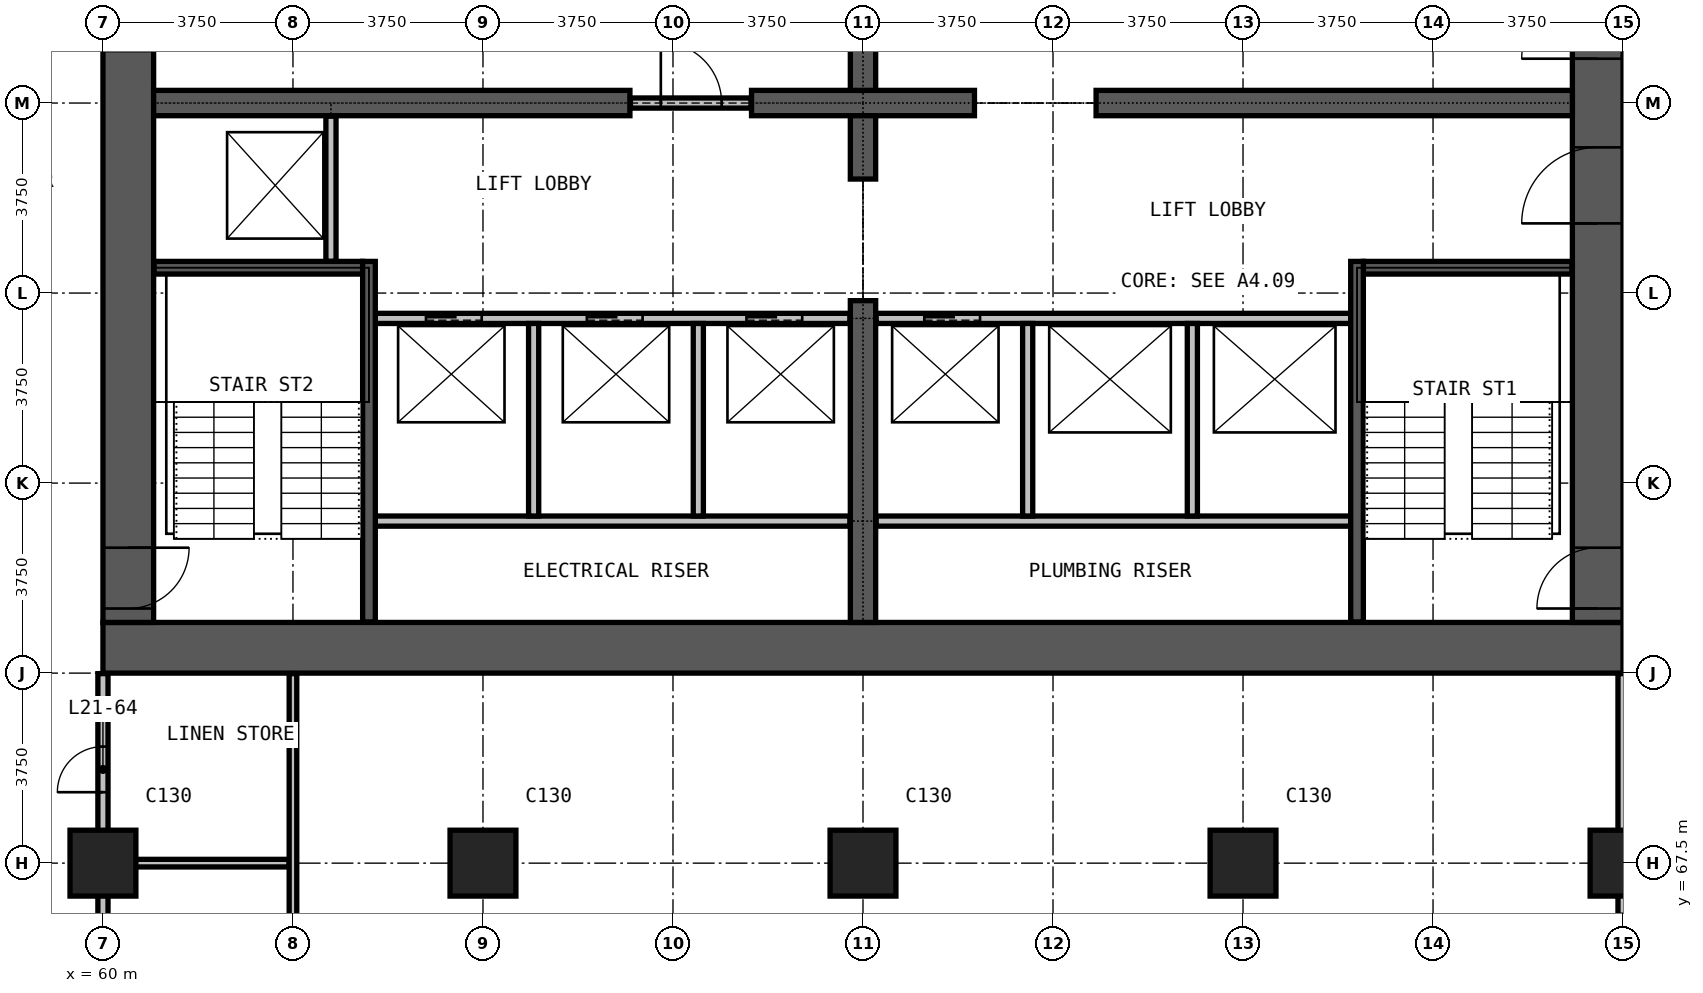
"""IFC4 building model, lengths in metres.
Left out: names, types, materials, properties, quantities, classifications, styles, units other than length and angle.
Written with IfcOpenShell. Run it as: python <this file> out.ifc"""

import sys

from ifc_helpers import new_model, si_unit, direction, frame, frame_2d, origin, origin_2d, place, context, subcontext, project, spatial, rectangle, extrude, element, fill, save


model = new_model("IFC4")
c1 = context("Model", 3, precision=1e-05, world=origin(), true_north=direction((0.0, 1.0)))
c2 = subcontext(c1, "Body", "Model", "MODEL_VIEW")
j1 = project(units=[si_unit("LENGTHUNIT", "METRE"), si_unit("PLANEANGLEUNIT", "RADIAN")], contexts=[c1])
p1 = place(None, origin())
s1 = spatial("IfcSite", under=j1, at=p1, CompositionType="ELEMENT")
p2 = place(p1, origin())
s2 = spatial("IfcBuilding", under=s1, at=p2, CompositionType="ELEMENT")
p3 = place(p2, frame((0.0, 0.0, 89.0)))
s3 = spatial("IfcBuildingStorey", under=s2, at=p3, CompositionType="ELEMENT", Elevation=89.0)
for number, where, z_axis, x_axis in (
    (1, (60.0, 67.5, 0.0), (0.0, 0.0, 1.0), (1.0, 0.0, 0.0)),
    (2, (67.5, 67.5, 0.0), (0.0, 0.0, 1.0), (1.0, 0.0, 0.0)),
    (3, (75.0, 67.5, 0.0), (0.0, 0.0, 1.0), (1.0, 0.0, 0.0)),
    (4, (82.5, 67.5, 0.0), (0.0, 0.0, 1.0), (1.0, 0.0, 0.0)),
    (5, (90.0, 67.5, 0.0), (0.0, 0.0, 1.0), (1.0, 0.0, 0.0)),
):
    element("IfcColumn", number, at=place(p3, frame(where, z_axis=z_axis, x_axis=x_axis)), inside=s3, PredefinedType="COLUMN", context=c2, shape_type="SweptSolid", body=[
        extrude(rectangle(XDim=1.3, YDim=1.3, at=origin_2d()), origin(), (0.0, 0.0, 1.0), 3.3),
    ])
p4 = place(p3, frame((60.0, 71.75, 0.0), z_axis=(0.0, 0.0, 1.0), x_axis=(1.0, 0.0, 0.0)))
e6 = element("IfcWall", 6, at=p4, inside=s3, PredefinedType="SHEAR", context=c2, shape_type="SweptSolid", body=[
    extrude(rectangle(XDim=30.0, YDim=1.0, at=frame_2d((15.0, 0.0))), origin(), (0.0, 0.0, 1.0), 3.3),
])
p5 = place(p3, frame((89.5, 72.25, 0.0), z_axis=(0.0, 0.0, 1.0), x_axis=(0.0, 1.0, 0.0)))
e7 = element("IfcWall", 7, at=p5, inside=s3, PredefinedType="SHEAR", context=c2, shape_type="SweptSolid", body=[
    extrude(rectangle(XDim=20.5, YDim=1.0, at=frame_2d((10.25, 0.0))), origin(), (0.0, 0.0, 1.0), 3.3),
])
p6 = place(p5, frame((0.275, 0.0, 0.0)))
e8 = element("IfcOpeningElement", 8, at=p6, cuts=e7, PredefinedType="OPENING", context=c2, shape_type="SweptSolid", body=[
    extrude(rectangle(XDim=1.2, YDim=2.2, at=frame_2d((0.6, 1.1))), frame((0.0, 0.51, 0.0), z_axis=(0.0, -1.0, 0.0), x_axis=(1.0, 0.0, 0.0)), (0.0, 0.0, 1.0), 1.02),
])
p7 = place(p5, frame((13.775, 0.0, 0.0)))
e9 = element("IfcOpeningElement", 9, at=p7, cuts=e7, PredefinedType="OPENING", context=c2, shape_type="SweptSolid", body=[
    extrude(rectangle(XDim=1.2, YDim=2.2, at=frame_2d((0.6, 1.1))), frame((0.0, 0.51, 0.0), z_axis=(0.0, -1.0, 0.0), x_axis=(1.0, 0.0, 0.0)), (0.0, 0.0, 1.0), 1.02),
])
p8 = place(p5, frame((7.875, 0.0, 0.0)))
e10 = element("IfcOpeningElement", 10, at=p8, cuts=e7, PredefinedType="OPENING", context=c2, shape_type="SweptSolid", body=[
    extrude(rectangle(XDim=1.5, YDim=2.2, at=frame_2d((0.75, 1.1))), frame((0.0, 0.51, 0.0), z_axis=(0.0, -1.0, 0.0), x_axis=(1.0, 0.0, 0.0)), (0.0, 0.0, 1.0), 1.02),
])
p9 = place(p5, frame((11.125, 0.0, 0.0)))
e11 = element("IfcOpeningElement", 11, at=p9, cuts=e7, PredefinedType="OPENING", context=c2, shape_type="SweptSolid", body=[
    extrude(rectangle(XDim=1.5, YDim=2.2, at=frame_2d((0.75, 1.1))), frame((0.0, 0.51, 0.0), z_axis=(0.0, -1.0, 0.0), x_axis=(1.0, 0.0, 0.0)), (0.0, 0.0, 1.0), 1.02),
])
p10 = place(p3, frame((60.5, 92.75, 0.0), z_axis=(0.0, 0.0, 1.0), x_axis=(0.0, -1.0, 0.0)))
e12 = element("IfcWall", 12, at=p10, inside=s3, PredefinedType="SHEAR", context=c2, shape_type="SweptSolid", body=[
    extrude(rectangle(XDim=20.5, YDim=1.0, at=frame_2d((10.25, 0.0))), origin(), (0.0, 0.0, 1.0), 3.3),
])
p11 = place(p10, frame((19.025, 0.0, 0.0)))
e13 = element("IfcOpeningElement", 13, at=p11, cuts=e12, PredefinedType="OPENING", context=c2, shape_type="SweptSolid", body=[
    extrude(rectangle(XDim=1.2, YDim=2.2, at=frame_2d((0.6, 1.1))), frame((0.0, 0.51, 0.0), z_axis=(0.0, -1.0, 0.0), x_axis=(1.0, 0.0, 0.0)), (0.0, 0.0, 1.0), 1.02),
])
p12 = place(p10, frame((8.025, 0.0, 0.0)))
e14 = element("IfcOpeningElement", 14, at=p12, cuts=e12, PredefinedType="OPENING", context=c2, shape_type="SweptSolid", body=[
    extrude(rectangle(XDim=1.2, YDim=2.2, at=frame_2d((0.6, 1.1))), frame((0.0, 0.51, 0.0), z_axis=(0.0, -1.0, 0.0), x_axis=(1.0, 0.0, 0.0)), (0.0, 0.0, 1.0), 1.02),
])
p13 = place(p3, frame((61.0, 82.5, 0.0), z_axis=(0.0, 0.0, 1.0), x_axis=(1.0, 0.0, 0.0)))
e15 = element("IfcWall", 15, at=p13, inside=s3, PredefinedType="SHEAR", context=c2, shape_type="SweptSolid", body=[
    extrude(rectangle(XDim=9.4, YDim=0.5, at=frame_2d((4.7, 0.0))), origin(), (0.0, 0.0, 1.0), 3.3),
])
p14 = place(p3, frame((72.8, 82.5, 0.0), z_axis=(0.0, 0.0, 1.0), x_axis=(1.0, 0.0, 0.0)))
e16 = element("IfcWall", 16, at=p14, inside=s3, PredefinedType="SHEAR", context=c2, shape_type="SweptSolid", body=[
    extrude(rectangle(XDim=4.4, YDim=0.5, at=frame_2d((2.2, 0.0))), origin(), (0.0, 0.0, 1.0), 3.3),
])
p15 = place(p3, frame((79.6, 82.5, 0.0), z_axis=(0.0, 0.0, 1.0), x_axis=(1.0, 0.0, 0.0)))
e17 = element("IfcWall", 17, at=p15, inside=s3, PredefinedType="SHEAR", context=c2, shape_type="SweptSolid", body=[
    extrude(rectangle(XDim=9.4, YDim=0.5, at=frame_2d((4.7, 0.0))), origin(), (0.0, 0.0, 1.0), 3.3),
])
p16 = place(p3, frame((75.0, 72.25, 0.0), z_axis=(0.0, 0.0, 1.0), x_axis=(0.0, 1.0, 0.0)))
e18 = element("IfcWall", 18, at=p16, inside=s3, PredefinedType="SHEAR", context=c2, shape_type="SweptSolid", body=[
    extrude(rectangle(XDim=6.35, YDim=0.5, at=frame_2d((3.175, 0.0))), origin(), (0.0, 0.0, 1.0), 3.3),
])
for number, where, z_axis, x_axis in (
    (19, (75.0, 81.0, 0.0), (0.0, 0.0, 1.0), (0.0, 1.0, 0.0)),
    (20, (75.0, 82.75, 0.0), (0.0, 0.0, 1.0), (0.0, 1.0, 0.0)),
):
    element("IfcWall", number, at=place(p3, frame(where, z_axis=z_axis, x_axis=x_axis)), inside=s3, PredefinedType="SHEAR", context=c2, shape_type="SweptSolid", body=[
        extrude(rectangle(XDim=1.25, YDim=0.5, at=frame_2d((0.625, 0.0))), origin(), (0.0, 0.0, 1.0), 3.3),
    ])
p17 = place(p3, frame((70.41, 82.5, 0.0), z_axis=(0.0, 0.0, 1.0), x_axis=(1.0, 0.0, 0.0)))
e21 = element("IfcWall", 21, at=p17, inside=s3, PredefinedType="PARTITIONING", context=c2, shape_type="SweptSolid", body=[
    extrude(rectangle(XDim=2.38, YDim=0.2, at=frame_2d((1.19, 0.0))), origin(), (0.0, 0.0, 1.0), 2.4),
])
p18 = place(p17, frame((0.6, 0.0, 0.0)))
e22 = element("IfcOpeningElement", 22, at=p18, cuts=e21, PredefinedType="OPENING", context=c2, shape_type="SweptSolid", body=[
    extrude(rectangle(XDim=1.2, YDim=2.2, at=frame_2d((0.6, 1.1))), frame((0.0, 0.11, 0.0), z_axis=(0.0, -1.0, 0.0), x_axis=(1.0, 0.0, 0.0)), (0.0, 0.0, 1.0), 0.22),
])
p19 = place(p3, frame((60.0, 52.4, 0.0), z_axis=(0.0, 0.0, 1.0), x_axis=(0.0, 1.0, 0.0)))
e23 = element("IfcWall", 23, at=p19, inside=s3, PredefinedType="PARTITIONING", context=c2, shape_type="SweptSolid", body=[
    extrude(rectangle(XDim=18.84, YDim=0.2, at=frame_2d((9.42, 0.0))), origin(), (0.0, 0.0, 1.0), 3.0),
])
p20 = place(p19, frame((3.35, 0.0, 0.0)))
e24 = element("IfcOpeningElement", 24, at=p20, cuts=e23, PredefinedType="OPENING", context=c2, shape_type="SweptSolid", body=[
    extrude(rectangle(XDim=1.0, YDim=2.2, at=frame_2d((0.5, 1.1))), frame((0.0, 0.11, 0.0), z_axis=(0.0, -1.0, 0.0), x_axis=(1.0, 0.0, 0.0)), (0.0, 0.0, 1.0), 0.22),
])
p21 = place(p19, frame((10.9, 0.0, 0.0)))
e25 = element("IfcOpeningElement", 25, at=p21, cuts=e23, PredefinedType="OPENING", context=c2, shape_type="SweptSolid", body=[
    extrude(rectangle(XDim=0.9, YDim=2.2, at=frame_2d((0.45, 1.1))), frame((0.0, 0.11, 0.0), z_axis=(0.0, -1.0, 0.0), x_axis=(1.0, 0.0, 0.0)), (0.0, 0.0, 1.0), 0.22),
])
p22 = place(p19, frame((16.5, 0.0, 0.0)))
e26 = element("IfcOpeningElement", 26, at=p22, cuts=e23, PredefinedType="OPENING", context=c2, shape_type="SweptSolid", body=[
    extrude(rectangle(XDim=0.9, YDim=2.2, at=frame_2d((0.45, 1.1))), frame((0.0, 0.11, 0.0), z_axis=(0.0, -1.0, 0.0), x_axis=(1.0, 0.0, 0.0)), (0.0, 0.0, 1.0), 0.22),
])
p23 = place(p3, frame((90.0, 52.4, 0.0), z_axis=(0.0, 0.0, 1.0), x_axis=(0.0, 1.0, 0.0)))
e27 = element("IfcWall", 27, at=p23, inside=s3, PredefinedType="PARTITIONING", context=c2, shape_type="SweptSolid", body=[
    extrude(rectangle(XDim=18.84, YDim=0.2, at=frame_2d((9.42, 0.0))), origin(), (0.0, 0.0, 1.0), 3.0),
])
p24 = place(p23, frame((3.35, 0.0, 0.0)))
e28 = element("IfcOpeningElement", 28, at=p24, cuts=e27, PredefinedType="OPENING", context=c2, shape_type="SweptSolid", body=[
    extrude(rectangle(XDim=1.0, YDim=2.2, at=frame_2d((0.5, 1.1))), frame((0.0, 0.11, 0.0), z_axis=(0.0, -1.0, 0.0), x_axis=(1.0, 0.0, 0.0)), (0.0, 0.0, 1.0), 0.22),
])
p25 = place(p23, frame((12.3, 0.0, 0.0)))
e29 = element("IfcOpeningElement", 29, at=p25, cuts=e27, PredefinedType="OPENING", context=c2, shape_type="SweptSolid", body=[
    extrude(rectangle(XDim=1.8, YDim=2.2, at=frame_2d((0.9, 1.1))), frame((0.0, 0.11, 0.0), z_axis=(0.0, -1.0, 0.0), x_axis=(1.0, 0.0, 0.0)), (0.0, 0.0, 1.0), 0.22),
])
p26 = place(p3, frame((60.1, 67.5, 0.0), z_axis=(0.0, 0.0, 1.0), x_axis=(1.0, 0.0, 0.0)))
e30 = element("IfcWall", 30, at=p26, inside=s3, PredefinedType="PARTITIONING", context=c2, shape_type="SweptSolid", body=[
    extrude(rectangle(XDim=3.575, YDim=0.15, at=frame_2d((1.788, 0.0))), origin(), (0.0, 0.0, 1.0), 3.0),
])
p27 = place(p3, frame((63.75, 60.075, 0.0), z_axis=(0.0, 0.0, 1.0), x_axis=(0.0, 1.0, 0.0)))
e31 = element("IfcWall", 31, at=p27, inside=s3, PredefinedType="PARTITIONING", context=c2, shape_type="SweptSolid", body=[
    extrude(rectangle(XDim=11.165, YDim=0.15, at=frame_2d((5.583, 0.0))), origin(), (0.0, 0.0, 1.0), 3.0),
])
for number, where, z_axis, x_axis in (
    (32, (65.375, 74.25, 0.0), (0.0, 0.0, 1.0), (1.0, 0.0, 0.0)),
    (33, (75.26, 74.25, 0.0), (0.0, 0.0, 1.0), (1.0, 0.0, 0.0)),
):
    element("IfcWall", number, at=place(p3, frame(where, z_axis=z_axis, x_axis=x_axis)), inside=s3, PredefinedType="PARTITIONING", context=c2, shape_type="SweptSolid", body=[
        extrude(rectangle(XDim=9.365, YDim=0.2, at=frame_2d((4.683, 0.0))), origin(), (0.0, 0.0, 1.0), 3.0),
    ])
p28 = place(p3, frame((65.375, 78.25, 0.0), z_axis=(0.0, 0.0, 1.0), x_axis=(1.0, 0.0, 0.0)))
e34 = element("IfcWall", 34, at=p28, inside=s3, PredefinedType="PARTITIONING", context=c2, shape_type="SweptSolid", body=[
    extrude(rectangle(XDim=9.365, YDim=0.2, at=frame_2d((4.683, 0.0))), origin(), (0.0, 0.0, 1.0), 3.0),
])
p29 = place(p28, frame((1.0, 0.0, 0.0)))
e35 = element("IfcOpeningElement", 35, at=p29, cuts=e34, PredefinedType="OPENING", context=c2, shape_type="SweptSolid", body=[
    extrude(rectangle(XDim=1.1, YDim=2.2, at=frame_2d((0.55, 1.1))), frame((0.0, 0.11, 0.0), z_axis=(0.0, -1.0, 0.0), x_axis=(1.0, 0.0, 0.0)), (0.0, 0.0, 1.0), 0.22),
])
p30 = place(p28, frame((4.175, 0.0, 0.0)))
e36 = element("IfcOpeningElement", 36, at=p30, cuts=e34, PredefinedType="OPENING", context=c2, shape_type="SweptSolid", body=[
    extrude(rectangle(XDim=1.1, YDim=2.2, at=frame_2d((0.55, 1.1))), frame((0.0, 0.11, 0.0), z_axis=(0.0, -1.0, 0.0), x_axis=(1.0, 0.0, 0.0)), (0.0, 0.0, 1.0), 0.22),
])
p31 = place(p28, frame((7.325, 0.0, 0.0)))
e37 = element("IfcOpeningElement", 37, at=p31, cuts=e34, PredefinedType="OPENING", context=c2, shape_type="SweptSolid", body=[
    extrude(rectangle(XDim=1.1, YDim=2.2, at=frame_2d((0.55, 1.1))), frame((0.0, 0.11, 0.0), z_axis=(0.0, -1.0, 0.0), x_axis=(1.0, 0.0, 0.0)), (0.0, 0.0, 1.0), 0.22),
])
p32 = place(p3, frame((75.26, 78.25, 0.0), z_axis=(0.0, 0.0, 1.0), x_axis=(1.0, 0.0, 0.0)))
e38 = element("IfcWall", 38, at=p32, inside=s3, PredefinedType="PARTITIONING", context=c2, shape_type="SweptSolid", body=[
    extrude(rectangle(XDim=9.365, YDim=0.2, at=frame_2d((4.683, 0.0))), origin(), (0.0, 0.0, 1.0), 3.0),
])
p33 = place(p32, frame((0.95, 0.0, 0.0)))
e39 = element("IfcOpeningElement", 39, at=p33, cuts=e38, PredefinedType="OPENING", context=c2, shape_type="SweptSolid", body=[
    extrude(rectangle(XDim=1.1, YDim=2.2, at=frame_2d((0.55, 1.1))), frame((0.0, 0.11, 0.0), z_axis=(0.0, -1.0, 0.0), x_axis=(1.0, 0.0, 0.0)), (0.0, 0.0, 1.0), 0.22),
])
p34 = place(p3, frame((64.5, 79.375, 0.0), z_axis=(0.0, 0.0, 1.0), x_axis=(0.0, 1.0, 0.0)))
e40 = element("IfcWall", 40, at=p34, inside=s3, PredefinedType="PARTITIONING", context=c2, shape_type="SweptSolid", body=[
    extrude(rectangle(XDim=2.865, YDim=0.2, at=frame_2d((1.433, 0.0))), origin(), (0.0, 0.0, 1.0), 3.0),
])
for number, where, z_axis, x_axis in (
    (41, (68.5, 74.35, 0.0), (0.0, 0.0, 1.0), (0.0, 1.0, 0.0)),
    (42, (71.75, 74.35, 0.0), (0.0, 0.0, 1.0), (0.0, 1.0, 0.0)),
    (43, (78.25, 74.35, 0.0), (0.0, 0.0, 1.0), (0.0, 1.0, 0.0)),
    (44, (81.5, 74.35, 0.0), (0.0, 0.0, 1.0), (0.0, 1.0, 0.0)),
):
    element("IfcWall", number, at=place(p3, frame(where, z_axis=z_axis, x_axis=x_axis)), inside=s3, PredefinedType="PARTITIONING", context=c2, shape_type="SweptSolid", body=[
        extrude(rectangle(XDim=3.8, YDim=0.2, at=frame_2d((1.9, 0.0))), origin(), (0.0, 0.0, 1.0), 3.0),
    ])
for number, where, z_axis, x_axis in (
    (45, (61.01, 79.25, 0.0), (0.0, 0.0, 1.0), (1.0, 0.0, 0.0)),
    (46, (84.875, 79.25, 0.0), (0.0, 0.0, 1.0), (1.0, 0.0, 0.0)),
):
    element("IfcWall", number, at=place(p3, frame(where, z_axis=z_axis, x_axis=x_axis)), inside=s3, PredefinedType="PARTITIONING", context=c2, shape_type="SweptSolid", body=[
        extrude(rectangle(XDim=4.115, YDim=0.25, at=frame_2d((2.058, 0.0))), origin(), (0.0, 0.0, 1.0), 3.0),
    ])
for number, where, z_axis, x_axis in (
    (47, (65.25, 72.26, 0.0), (0.0, 0.0, 1.0), (0.0, 1.0, 0.0)),
    (48, (84.75, 72.26, 0.0), (0.0, 0.0, 1.0), (0.0, 1.0, 0.0)),
):
    element("IfcWall", number, at=place(p3, frame(where, z_axis=z_axis, x_axis=x_axis)), inside=s3, PredefinedType="PARTITIONING", context=c2, shape_type="SweptSolid", body=[
        extrude(rectangle(XDim=7.115, YDim=0.25, at=frame_2d((3.558, 0.0))), origin(), (0.0, 0.0, 1.0), 3.0),
    ])
p35 = place(p29, origin())
e49 = element("IfcDoor", 49, at=p35, inside=s3, OperationType="DOUBLE_DOOR_SLIDING", PredefinedType="DOOR", context=c2, shape_type="SweptSolid", body=[
    extrude(rectangle(XDim=1.1, YDim=2.2, at=frame_2d((0.55, 1.1))), frame((0.0, 0.025, 0.0), z_axis=(0.0, -1.0, 0.0), x_axis=(1.0, 0.0, 0.0)), (0.0, 0.0, 1.0), 0.05),
])
fill(e35, e49)
p36 = place(p30, origin())
e50 = element("IfcDoor", 50, at=p36, inside=s3, OperationType="DOUBLE_DOOR_SLIDING", PredefinedType="DOOR", context=c2, shape_type="SweptSolid", body=[
    extrude(rectangle(XDim=1.1, YDim=2.2, at=frame_2d((0.55, 1.1))), frame((0.0, 0.025, 0.0), z_axis=(0.0, -1.0, 0.0), x_axis=(1.0, 0.0, 0.0)), (0.0, 0.0, 1.0), 0.05),
])
fill(e36, e50)
p37 = place(p31, origin())
e51 = element("IfcDoor", 51, at=p37, inside=s3, OperationType="DOUBLE_DOOR_SLIDING", PredefinedType="DOOR", context=c2, shape_type="SweptSolid", body=[
    extrude(rectangle(XDim=1.1, YDim=2.2, at=frame_2d((0.55, 1.1))), frame((0.0, 0.025, 0.0), z_axis=(0.0, -1.0, 0.0), x_axis=(1.0, 0.0, 0.0)), (0.0, 0.0, 1.0), 0.05),
])
fill(e37, e51)
p38 = place(p33, origin())
e52 = element("IfcDoor", 52, at=p38, inside=s3, OperationType="DOUBLE_DOOR_SLIDING", PredefinedType="DOOR", context=c2, shape_type="SweptSolid", body=[
    extrude(rectangle(XDim=1.1, YDim=2.2, at=frame_2d((0.55, 1.1))), frame((0.0, 0.025, 0.0), z_axis=(0.0, -1.0, 0.0), x_axis=(1.0, 0.0, 0.0)), (0.0, 0.0, 1.0), 0.05),
])
fill(e39, e52)
p39 = place(p18, origin())
e53 = element("IfcDoor", 53, at=p39, inside=s3, OperationType="SINGLE_SWING_LEFT", PredefinedType="DOOR", context=c2, shape_type="SweptSolid", body=[
    extrude(rectangle(XDim=1.2, YDim=2.2, at=frame_2d((0.6, 1.1))), frame((0.0, 0.025, 0.0), z_axis=(0.0, -1.0, 0.0), x_axis=(1.0, 0.0, 0.0)), (0.0, 0.0, 1.0), 0.05),
])
fill(e22, e53)
p40 = place(p6, origin())
e54 = element("IfcDoor", 54, at=p40, inside=s3, OperationType="SINGLE_SWING_RIGHT", PredefinedType="DOOR", context=c2, shape_type="SweptSolid", body=[
    extrude(rectangle(XDim=1.2, YDim=2.2, at=frame_2d((0.6, 1.1))), frame((0.0, 0.025, 0.0), z_axis=(0.0, -1.0, 0.0), x_axis=(1.0, 0.0, 0.0)), (0.0, 0.0, 1.0), 0.05),
])
fill(e8, e54)
p41 = place(p11, origin())
e55 = element("IfcDoor", 55, at=p41, inside=s3, OperationType="SINGLE_SWING_RIGHT", PredefinedType="DOOR", context=c2, shape_type="SweptSolid", body=[
    extrude(rectangle(XDim=1.2, YDim=2.2, at=frame_2d((0.6, 1.1))), frame((0.0, 0.025, 0.0), z_axis=(0.0, -1.0, 0.0), x_axis=(1.0, 0.0, 0.0)), (0.0, 0.0, 1.0), 0.05),
])
fill(e13, e55)
p42 = place(p8, origin())
e56 = element("IfcDoor", 56, at=p42, inside=s3, OperationType="DOUBLE_DOOR_SINGLE_SWING", PredefinedType="DOOR", context=c2, shape_type="SweptSolid", body=[
    extrude(rectangle(XDim=1.5, YDim=2.2, at=frame_2d((0.75, 1.1))), frame((0.0, 0.025, 0.0), z_axis=(0.0, -1.0, 0.0), x_axis=(1.0, 0.0, 0.0)), (0.0, 0.0, 1.0), 0.05),
])
fill(e10, e56)
p43 = place(p9, origin())
e57 = element("IfcDoor", 57, at=p43, inside=s3, OperationType="DOUBLE_DOOR_SINGLE_SWING", PredefinedType="DOOR", context=c2, shape_type="SweptSolid", body=[
    extrude(rectangle(XDim=1.5, YDim=2.2, at=frame_2d((0.75, 1.1))), frame((0.0, 0.025, 0.0), z_axis=(0.0, -1.0, 0.0), x_axis=(1.0, 0.0, 0.0)), (0.0, 0.0, 1.0), 0.05),
])
fill(e11, e57)
p44 = place(p22, origin())
e58 = element("IfcDoor", 58, at=p44, inside=s3, OperationType="SINGLE_SWING_LEFT", PredefinedType="DOOR", context=c2, shape_type="SweptSolid", body=[
    extrude(rectangle(XDim=0.9, YDim=2.2, at=frame_2d((0.45, 1.1))), frame((0.0, 0.025, 0.0), z_axis=(0.0, -1.0, 0.0), x_axis=(1.0, 0.0, 0.0)), (0.0, 0.0, 1.0), 0.05),
])
fill(e26, e58)
save(model, sys.argv[1])
